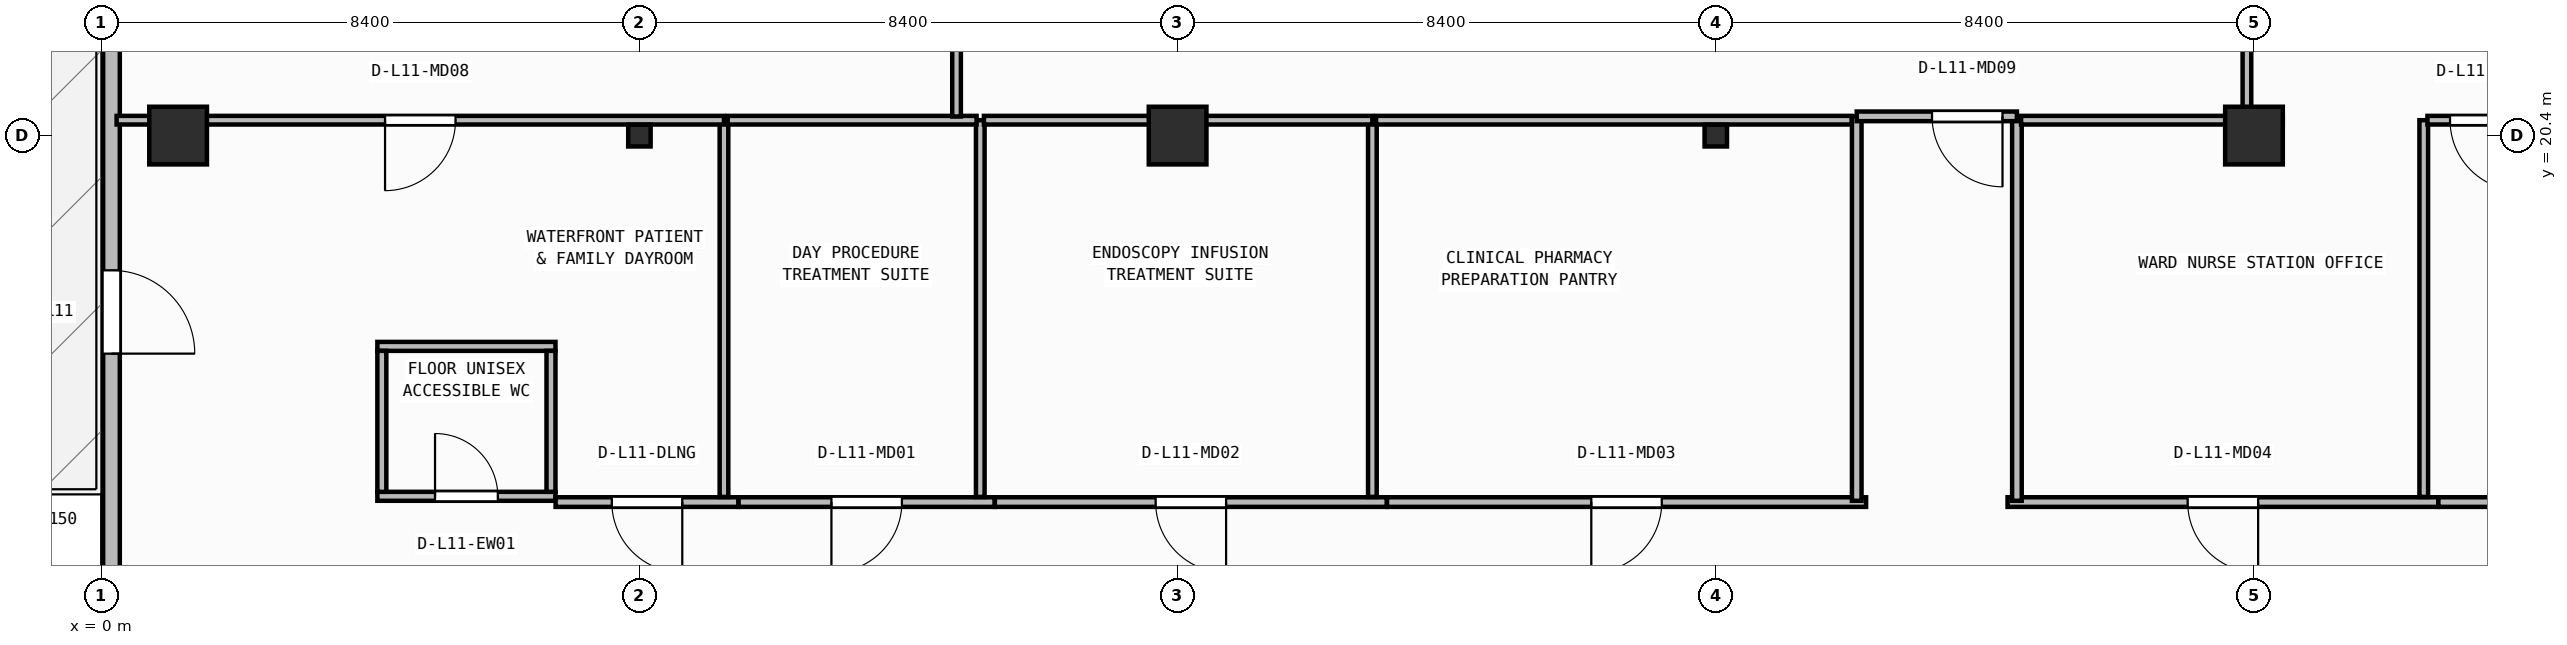
"""IFC4 building model, lengths in metres.
Left out: names, types, materials, properties, quantities, classifications, styles, units other than length and angle.
Written with IfcOpenShell. Run it as: python <this file> out.ifc"""

import sys

from ifc_helpers import new_model, si_unit, direction, frame, frame_2d, origin, origin_2d, place, context, subcontext, project, spatial, rectangle, i_section, extrude, element, fill, save


model = new_model("IFC4")
c1 = context("Model", 3, precision=1e-05, world=origin(), true_north=direction((0.0, 1.0)))
c2 = subcontext(c1, "Body", "Model", "MODEL_VIEW")
j1 = project(units=[si_unit("LENGTHUNIT", "METRE"), si_unit("PLANEANGLEUNIT", "RADIAN")], contexts=[c1])
p1 = place(None, origin())
s1 = spatial("IfcSite", under=j1, at=p1, CompositionType="ELEMENT")
p2 = place(p1, origin())
s2 = spatial("IfcBuilding", under=s1, at=p2, CompositionType="ELEMENT")
p3 = place(p2, frame((0.0, 0.0, 46.2)))
s3 = spatial("IfcBuildingStorey", under=s2, at=p3, CompositionType="ELEMENT", Elevation=46.2)
p4 = place(p3, frame((1.2, 20.4, 0.0), z_axis=(0.0, 0.0, 1.0), x_axis=(1.0, 0.0, 0.0)))
e1 = element("IfcColumn", 1, at=p4, inside=s3, PredefinedType="COLUMN", context=c2, shape_type="SweptSolid", body=[
    extrude(rectangle(XDim=0.9, YDim=0.9, at=origin_2d()), origin(), (0.0, 0.0, 1.0), 3.95),
])
p5 = place(p3, frame((8.4, 20.4, 0.0), z_axis=(0.0, 0.0, 1.0), x_axis=(1.0, 0.0, 0.0)))
e2 = element("IfcColumn", 2, at=p5, inside=s3, PredefinedType="COLUMN", context=c2, shape_type="SweptSolid", body=[
    extrude(i_section(OverallWidth=0.35, OverallDepth=0.34, WebThickness=0.016, FlangeThickness=0.028, at=origin_2d()), origin(), (0.0, 0.0, 1.0), 3.95),
])
p6 = place(p3, frame((16.8, 20.4, 0.0), z_axis=(0.0, 0.0, 1.0), x_axis=(1.0, 0.0, 0.0)))
e3 = element("IfcColumn", 3, at=p6, inside=s3, PredefinedType="COLUMN", context=c2, shape_type="SweptSolid", body=[
    extrude(rectangle(XDim=0.9, YDim=0.9, at=origin_2d()), origin(), (0.0, 0.0, 1.0), 3.95),
])
p7 = place(p3, frame((25.2, 20.4, 0.0), z_axis=(0.0, 0.0, 1.0), x_axis=(1.0, 0.0, 0.0)))
e4 = element("IfcColumn", 4, at=p7, inside=s3, PredefinedType="COLUMN", context=c2, shape_type="SweptSolid", body=[
    extrude(i_section(OverallWidth=0.35, OverallDepth=0.34, WebThickness=0.016, FlangeThickness=0.028, at=origin_2d()), origin(), (0.0, 0.0, 1.0), 3.95),
])
p8 = place(p3, frame((33.6, 20.4, 0.0), z_axis=(0.0, 0.0, 1.0), x_axis=(1.0, 0.0, 0.0)))
e5 = element("IfcColumn", 5, at=p8, inside=s3, PredefinedType="COLUMN", context=c2, shape_type="SweptSolid", body=[
    extrude(rectangle(XDim=0.9, YDim=0.9, at=origin_2d()), origin(), (0.0, 0.0, 1.0), 3.95),
])
p9 = place(p3, frame((0.16, 41.04, 0.0), z_axis=(0.0, 0.0, 1.0), x_axis=(0.0, -1.0, 0.0)))
e6 = element("IfcWall", 6, at=p9, inside=s3, PredefinedType="STANDARD", context=c2, shape_type="SweptSolid", body=[
    extrude(rectangle(XDim=38.28, YDim=0.26, at=frame_2d((19.14, 0.0))), origin(), (0.0, 0.0, 1.0), 3.71),
])
p10 = place(p9, frame((22.743, 0.0, 0.0)))
e7 = element("IfcOpeningElement", 7, at=p10, cuts=e6, PredefinedType="OPENING", context=c2, shape_type="SweptSolid", body=[
    extrude(rectangle(XDim=1.3, YDim=2.15, at=frame_2d((0.65, 1.075))), frame((0.0, 0.14, 0.0), z_axis=(0.0, -1.0, 0.0), x_axis=(1.0, 0.0, 0.0)), (0.0, 0.0, 1.0), 0.28),
])
p11 = place(p3, frame((4.31, 14.77, 0.0), z_axis=(0.0, 0.0, 1.0), x_axis=(1.0, 0.0, 0.0)))
e8 = element("IfcWall", 8, at=p11, inside=s3, PredefinedType="PARTITIONING", context=c2, shape_type="SweptSolid", body=[
    extrude(rectangle(XDim=2.78, YDim=0.14, at=frame_2d((1.39, 0.0))), origin(), (0.0, 0.0, 1.0), 3.71),
])
p12 = place(p11, frame((0.9, 0.0, 0.0)))
e9 = element("IfcOpeningElement", 9, at=p12, cuts=e8, PredefinedType="OPENING", context=c2, shape_type="SweptSolid", body=[
    extrude(rectangle(XDim=0.98, YDim=2.1, at=frame_2d((0.49, 1.05))), frame((0.0, 0.08, 0.0), z_axis=(0.0, -1.0, 0.0), x_axis=(1.0, 0.0, 0.0)), (0.0, 0.0, 1.0), 0.16),
])
p13 = place(p3, frame((4.31, 17.11, 0.0), z_axis=(0.0, 0.0, 1.0), x_axis=(1.0, 0.0, 0.0)))
e10 = element("IfcWall", 10, at=p13, inside=s3, PredefinedType="PARTITIONING", context=c2, shape_type="SweptSolid", body=[
    extrude(rectangle(XDim=2.78, YDim=0.14, at=frame_2d((1.39, 0.0))), origin(), (0.0, 0.0, 1.0), 3.71),
])
for number, where, z_axis, x_axis in (
    (11, (4.38, 14.84, 0.0), (0.0, 0.0, 1.0), (0.0, 1.0, 0.0)),
    (12, (7.02, 14.84, 0.0), (0.0, 0.0, 1.0), (0.0, 1.0, 0.0)),
):
    element("IfcWall", number, at=place(p3, frame(where, z_axis=z_axis, x_axis=x_axis)), inside=s3, PredefinedType="PARTITIONING", context=c2, shape_type="SweptSolid", body=[
        extrude(rectangle(XDim=2.2, YDim=0.14, at=frame_2d((1.1, 0.0))), origin(), (0.0, 0.0, 1.0), 3.71),
    ])
p14 = place(p3, frame((9.946, 14.68, 0.0), z_axis=(0.0, 0.0, 1.0), x_axis=(-1.0, 0.0, 0.0)))
e13 = element("IfcWall", 13, at=p14, inside=s3, PredefinedType="PARTITIONING", context=c2, shape_type="SweptSolid", body=[
    extrude(rectangle(XDim=2.854, YDim=0.15, at=frame_2d((1.427, 0.0))), origin(), (0.0, 0.0, 1.0), 3.71),
])
p15 = place(p14, frame((0.877, 0.0, 0.0)))
e14 = element("IfcOpeningElement", 14, at=p15, cuts=e13, PredefinedType="OPENING", context=c2, shape_type="SweptSolid", body=[
    extrude(rectangle(XDim=1.1, YDim=2.1, at=frame_2d((0.55, 1.05))), frame((0.0, 0.085, 0.0), z_axis=(0.0, -1.0, 0.0), x_axis=(1.0, 0.0, 0.0)), (0.0, 0.0, 1.0), 0.17),
])
p16 = place(p3, frame((13.946, 14.68, 0.0), z_axis=(0.0, 0.0, 1.0), x_axis=(-1.0, 0.0, 0.0)))
e15 = element("IfcWall", 15, at=p16, inside=s3, PredefinedType="PARTITIONING", context=c2, shape_type="SweptSolid", body=[
    extrude(rectangle(XDim=3.998, YDim=0.15, at=frame_2d((1.999, 0.0))), origin(), (0.0, 0.0, 1.0), 3.71),
])
p17 = place(p16, frame((1.449, 0.0, 0.0)))
e16 = element("IfcOpeningElement", 16, at=p17, cuts=e15, PredefinedType="OPENING", context=c2, shape_type="SweptSolid", body=[
    extrude(rectangle(XDim=1.1, YDim=2.1, at=frame_2d((0.55, 1.05))), frame((0.0, 0.085, 0.0), z_axis=(0.0, -1.0, 0.0), x_axis=(1.0, 0.0, 0.0)), (0.0, 0.0, 1.0), 0.17),
])
p18 = place(p3, frame((20.066, 14.68, 0.0), z_axis=(0.0, 0.0, 1.0), x_axis=(-1.0, 0.0, 0.0)))
e17 = element("IfcWall", 17, at=p18, inside=s3, PredefinedType="PARTITIONING", context=c2, shape_type="SweptSolid", body=[
    extrude(rectangle(XDim=6.118, YDim=0.15, at=frame_2d((3.059, 0.0))), origin(), (0.0, 0.0, 1.0), 3.71),
])
p19 = place(p18, frame((2.509, 0.0, 0.0)))
e18 = element("IfcOpeningElement", 18, at=p19, cuts=e17, PredefinedType="OPENING", context=c2, shape_type="SweptSolid", body=[
    extrude(rectangle(XDim=1.1, YDim=2.1, at=frame_2d((0.55, 1.05))), frame((0.0, 0.085, 0.0), z_axis=(0.0, -1.0, 0.0), x_axis=(1.0, 0.0, 0.0)), (0.0, 0.0, 1.0), 0.17),
])
p20 = place(p3, frame((27.546, 14.68, 0.0), z_axis=(0.0, 0.0, 1.0), x_axis=(-1.0, 0.0, 0.0)))
e19 = element("IfcWall", 19, at=p20, inside=s3, PredefinedType="PARTITIONING", context=c2, shape_type="SweptSolid", body=[
    extrude(rectangle(XDim=7.478, YDim=0.15, at=frame_2d((3.739, 0.0))), origin(), (0.0, 0.0, 1.0), 3.71),
])
p21 = place(p20, frame((3.189, 0.0, 0.0)))
e20 = element("IfcOpeningElement", 20, at=p21, cuts=e19, PredefinedType="OPENING", context=c2, shape_type="SweptSolid", body=[
    extrude(rectangle(XDim=1.1, YDim=2.1, at=frame_2d((0.55, 1.05))), frame((0.0, 0.085, 0.0), z_axis=(0.0, -1.0, 0.0), x_axis=(1.0, 0.0, 0.0)), (0.0, 0.0, 1.0), 0.17),
])
p22 = place(p3, frame((36.476, 14.68, 0.0), z_axis=(0.0, 0.0, 1.0), x_axis=(-1.0, 0.0, 0.0)))
e21 = element("IfcWall", 21, at=p22, inside=s3, PredefinedType="PARTITIONING", context=c2, shape_type="SweptSolid", body=[
    extrude(rectangle(XDim=6.722, YDim=0.15, at=frame_2d((3.361, 0.0))), origin(), (0.0, 0.0, 1.0), 3.71),
])
p23 = place(p22, frame((2.811, 0.0, 0.0)))
e22 = element("IfcOpeningElement", 22, at=p23, cuts=e21, PredefinedType="OPENING", context=c2, shape_type="SweptSolid", body=[
    extrude(rectangle(XDim=1.1, YDim=2.1, at=frame_2d((0.55, 1.05))), frame((0.0, 0.085, 0.0), z_axis=(0.0, -1.0, 0.0), x_axis=(1.0, 0.0, 0.0)), (0.0, 0.0, 1.0), 0.17),
])
p24 = place(p3, frame((44.136, 14.68, 0.0), z_axis=(0.0, 0.0, 1.0), x_axis=(-1.0, 0.0, 0.0)))
e23 = element("IfcWall", 23, at=p24, inside=s3, PredefinedType="PARTITIONING", context=c2, shape_type="SweptSolid", body=[
    extrude(rectangle(XDim=7.658, YDim=0.15, at=frame_2d((3.829, 0.0))), origin(), (0.0, 0.0, 1.0), 3.71),
])
p25 = place(p24, frame((3.279, 0.0, 0.0)))
e24 = element("IfcOpeningElement", 24, at=p25, cuts=e23, PredefinedType="OPENING", context=c2, shape_type="SweptSolid", body=[
    extrude(rectangle(XDim=1.1, YDim=2.1, at=frame_2d((0.55, 1.05))), frame((0.0, 0.085, 0.0), z_axis=(0.0, -1.0, 0.0), x_axis=(1.0, 0.0, 0.0)), (0.0, 0.0, 1.0), 0.17),
])
for number, where, z_axis, x_axis in (
    (25, (27.4, 20.7, 0.0), (0.0, 0.0, 1.0), (0.0, -1.0, 0.0)),
    (26, (29.9, 14.7, 0.0), (0.0, 0.0, 1.0), (0.0, 1.0, 0.0)),
):
    element("IfcWall", number, at=place(p3, frame(where, z_axis=z_axis, x_axis=x_axis)), inside=s3, PredefinedType="PARTITIONING", context=c2, shape_type="SweptSolid", body=[
        extrude(rectangle(XDim=6.0, YDim=0.15, at=frame_2d((3.0, 0.0))), origin(), (0.0, 0.0, 1.0), 3.71),
    ])
p26 = place(p3, frame((29.9, 20.7, 0.0), z_axis=(0.0, 0.0, 1.0), x_axis=(-1.0, 0.0, 0.0)))
e27 = element("IfcWall", 27, at=p26, inside=s3, PredefinedType="PARTITIONING", context=c2, shape_type="SweptSolid", body=[
    extrude(rectangle(XDim=2.5, YDim=0.15, at=frame_2d((1.25, 0.0))), origin(), (0.0, 0.0, 1.0), 3.073),
])
p27 = place(p26, frame((0.225, 0.0, 0.0)))
e28 = element("IfcOpeningElement", 28, at=p27, cuts=e27, PredefinedType="OPENING", context=c2, shape_type="SweptSolid", body=[
    extrude(rectangle(XDim=1.1, YDim=2.1, at=frame_2d((0.55, 1.05))), frame((0.0, 0.085, 0.0), z_axis=(0.0, -1.0, 0.0), x_axis=(1.0, 0.0, 0.0)), (0.0, 0.0, 1.0), 0.17),
])
p28 = place(p3, frame((9.72, 14.76, 0.0), z_axis=(0.0, 0.0, 1.0), x_axis=(0.0, 1.0, 0.0)))
e29 = element("IfcWall", 29, at=p28, inside=s3, PredefinedType="PARTITIONING", context=c2, shape_type="SweptSolid", body=[
    extrude(rectangle(XDim=5.88, YDim=0.135, at=frame_2d((2.94, 0.0))), origin(), (0.0, 0.0, 1.0), 3.71),
])
p29 = place(p3, frame((9.72, 20.64, 0.0), z_axis=(0.0, 0.0, 1.0), x_axis=(-1.0, 0.0, 0.0)))
e30 = element("IfcWall", 30, at=p29, inside=s3, PredefinedType="PARTITIONING", context=c2, shape_type="SweptSolid", body=[
    extrude(rectangle(XDim=9.48, YDim=0.135, at=frame_2d((4.74, 0.0))), origin(), (0.0, 0.0, 1.0), 3.073),
])
p30 = place(p29, frame((4.19, 0.0, 0.0)))
e31 = element("IfcOpeningElement", 31, at=p30, cuts=e30, PredefinedType="OPENING", context=c2, shape_type="SweptSolid", body=[
    extrude(rectangle(XDim=1.1, YDim=2.1, at=frame_2d((0.55, 1.05))), frame((0.0, 0.077, 0.0), z_axis=(0.0, -1.0, 0.0), x_axis=(1.0, 0.0, 0.0)), (0.0, 0.0, 1.0), 0.155),
])
p31 = place(p3, frame((13.72, 14.76, 0.0), z_axis=(0.0, 0.0, 1.0), x_axis=(0.0, 1.0, 0.0)))
e32 = element("IfcWall", 32, at=p31, inside=s3, PredefinedType="PARTITIONING", context=c2, shape_type="SweptSolid", body=[
    extrude(rectangle(XDim=5.88, YDim=0.135, at=frame_2d((2.94, 0.0))), origin(), (0.0, 0.0, 1.0), 3.71),
])
p32 = place(p3, frame((13.663, 20.64, 0.0), z_axis=(0.0, 0.0, 1.0), x_axis=(-1.0, 0.0, 0.0)))
e33 = element("IfcWall", 33, at=p32, inside=s3, PredefinedType="PARTITIONING", context=c2, shape_type="SweptSolid", body=[
    extrude(rectangle(XDim=3.885, YDim=0.135, at=frame_2d((1.942, 0.0))), origin(), (0.0, 0.0, 1.0), 3.073),
])
p33 = place(p3, frame((19.84, 14.76, 0.0), z_axis=(0.0, 0.0, 1.0), x_axis=(0.0, 1.0, 0.0)))
e34 = element("IfcWall", 34, at=p33, inside=s3, PredefinedType="PARTITIONING", context=c2, shape_type="SweptSolid", body=[
    extrude(rectangle(XDim=5.88, YDim=0.135, at=frame_2d((2.94, 0.0))), origin(), (0.0, 0.0, 1.0), 3.71),
])
p34 = place(p3, frame((19.84, 20.64, 0.0), z_axis=(0.0, 0.0, 1.0), x_axis=(-1.0, 0.0, 0.0)))
e35 = element("IfcWall", 35, at=p34, inside=s3, PredefinedType="PARTITIONING", context=c2, shape_type="SweptSolid", body=[
    extrude(rectangle(XDim=6.062, YDim=0.135, at=frame_2d((3.031, 0.0))), origin(), (0.0, 0.0, 1.0), 3.073),
])
p35 = place(p3, frame((27.32, 20.64, 0.0), z_axis=(0.0, 0.0, 1.0), x_axis=(-1.0, 0.0, 0.0)))
e36 = element("IfcWall", 36, at=p35, inside=s3, PredefinedType="PARTITIONING", context=c2, shape_type="SweptSolid", body=[
    extrude(rectangle(XDim=7.423, YDim=0.135, at=frame_2d((3.711, 0.0))), origin(), (0.0, 0.0, 1.0), 3.073),
])
p36 = place(p3, frame((36.25, 14.76, 0.0), z_axis=(0.0, 0.0, 1.0), x_axis=(0.0, 1.0, 0.0)))
e37 = element("IfcWall", 37, at=p36, inside=s3, PredefinedType="PARTITIONING", context=c2, shape_type="SweptSolid", body=[
    extrude(rectangle(XDim=5.88, YDim=0.135, at=frame_2d((2.94, 0.0))), origin(), (0.0, 0.0, 1.0), 3.71),
])
p37 = place(p3, frame((34.05, 20.64, 0.0), z_axis=(0.0, 0.0, 1.0), x_axis=(-1.0, 0.0, 0.0)))
e38 = element("IfcWall", 38, at=p37, inside=s3, PredefinedType="PARTITIONING", context=c2, shape_type="SweptSolid", body=[
    extrude(rectangle(XDim=4.085, YDim=0.135, at=frame_2d((2.042, 0.0))), origin(), (0.0, 0.0, 1.0), 3.073),
])
p38 = place(p3, frame((43.91, 20.64, 0.0), z_axis=(0.0, 0.0, 1.0), x_axis=(-1.0, 0.0, 0.0)))
e39 = element("IfcWall", 39, at=p38, inside=s3, PredefinedType="PARTITIONING", context=c2, shape_type="SweptSolid", body=[
    extrude(rectangle(XDim=7.602, YDim=0.135, at=frame_2d((3.801, 0.0))), origin(), (0.0, 0.0, 1.0), 3.073),
])
p39 = place(p38, frame((6.15, 0.0, 0.0)))
e40 = element("IfcOpeningElement", 40, at=p39, cuts=e39, PredefinedType="OPENING", context=c2, shape_type="SweptSolid", body=[
    extrude(rectangle(XDim=1.1, YDim=2.1, at=frame_2d((0.55, 1.05))), frame((0.0, 0.077, 0.0), z_axis=(0.0, -1.0, 0.0), x_axis=(1.0, 0.0, 0.0)), (0.0, 0.0, 1.0), 0.155),
])
p40 = place(p3, frame((13.35, 20.698, 0.0), z_axis=(0.0, 0.0, 1.0), x_axis=(0.0, 1.0, 0.0)))
e41 = element("IfcWall", 41, at=p40, inside=s3, PredefinedType="PARTITIONING", context=c2, shape_type="SweptSolid", body=[
    extrude(rectangle(XDim=6.442, YDim=0.135, at=frame_2d((3.221, 0.0))), origin(), (0.0, 0.0, 1.0), 3.71),
])
p41 = place(p3, frame((33.49, 20.698, 0.0), z_axis=(0.0, 0.0, 1.0), x_axis=(0.0, 1.0, 0.0)))
e42 = element("IfcWall", 42, at=p41, inside=s3, PredefinedType="PARTITIONING", context=c2, shape_type="SweptSolid", body=[
    extrude(rectangle(XDim=6.442, YDim=0.135, at=frame_2d((3.221, 0.0))), origin(), (0.0, 0.0, 1.0), 3.073),
])
p42 = place(p10, origin())
e43 = element("IfcDoor", 43, at=p42, inside=s3, OperationType="SINGLE_SWING_RIGHT", PredefinedType="DOOR", context=c2, shape_type="SweptSolid", body=[
    extrude(rectangle(XDim=1.3, YDim=2.15, at=frame_2d((0.65, 1.075))), frame((0.0, 0.025, 0.0), z_axis=(0.0, -1.0, 0.0), x_axis=(1.0, 0.0, 0.0)), (0.0, 0.0, 1.0), 0.05),
])
fill(e7, e43)
p43 = place(p12, origin())
e44 = element("IfcDoor", 44, at=p43, inside=s3, OperationType="SINGLE_SWING_LEFT", PredefinedType="DOOR", context=c2, shape_type="SweptSolid", body=[
    extrude(rectangle(XDim=0.98, YDim=2.1, at=frame_2d((0.49, 1.05))), frame((0.0, 0.025, 0.0), z_axis=(0.0, -1.0, 0.0), x_axis=(1.0, 0.0, 0.0)), (0.0, 0.0, 1.0), 0.05),
])
fill(e9, e44)
p44 = place(p15, origin())
e45 = element("IfcDoor", 45, at=p44, inside=s3, OperationType="SINGLE_SWING_LEFT", PredefinedType="DOOR", context=c2, shape_type="SweptSolid", body=[
    extrude(rectangle(XDim=1.1, YDim=2.1, at=frame_2d((0.55, 1.05))), frame((0.0, 0.025, 0.0), z_axis=(0.0, -1.0, 0.0), x_axis=(1.0, 0.0, 0.0)), (0.0, 0.0, 1.0), 0.05),
])
fill(e14, e45)
p45 = place(p17, origin())
e46 = element("IfcDoor", 46, at=p45, inside=s3, OperationType="SINGLE_SWING_RIGHT", PredefinedType="DOOR", context=c2, shape_type="SweptSolid", body=[
    extrude(rectangle(XDim=1.1, YDim=2.1, at=frame_2d((0.55, 1.05))), frame((0.0, 0.025, 0.0), z_axis=(0.0, -1.0, 0.0), x_axis=(1.0, 0.0, 0.0)), (0.0, 0.0, 1.0), 0.05),
])
fill(e16, e46)
p46 = place(p19, origin())
e47 = element("IfcDoor", 47, at=p46, inside=s3, OperationType="SINGLE_SWING_LEFT", PredefinedType="DOOR", context=c2, shape_type="SweptSolid", body=[
    extrude(rectangle(XDim=1.1, YDim=2.1, at=frame_2d((0.55, 1.05))), frame((0.0, 0.025, 0.0), z_axis=(0.0, -1.0, 0.0), x_axis=(1.0, 0.0, 0.0)), (0.0, 0.0, 1.0), 0.05),
])
fill(e18, e47)
p47 = place(p21, origin())
e48 = element("IfcDoor", 48, at=p47, inside=s3, OperationType="SINGLE_SWING_RIGHT", PredefinedType="DOOR", context=c2, shape_type="SweptSolid", body=[
    extrude(rectangle(XDim=1.1, YDim=2.1, at=frame_2d((0.55, 1.05))), frame((0.0, 0.025, 0.0), z_axis=(0.0, -1.0, 0.0), x_axis=(1.0, 0.0, 0.0)), (0.0, 0.0, 1.0), 0.05),
])
fill(e20, e48)
p48 = place(p23, origin())
e49 = element("IfcDoor", 49, at=p48, inside=s3, OperationType="SINGLE_SWING_LEFT", PredefinedType="DOOR", context=c2, shape_type="SweptSolid", body=[
    extrude(rectangle(XDim=1.1, YDim=2.1, at=frame_2d((0.55, 1.05))), frame((0.0, 0.025, 0.0), z_axis=(0.0, -1.0, 0.0), x_axis=(1.0, 0.0, 0.0)), (0.0, 0.0, 1.0), 0.05),
])
fill(e22, e49)
p49 = place(p27, origin())
e50 = element("IfcDoor", 50, at=p49, inside=s3, OperationType="SINGLE_SWING_LEFT", PredefinedType="DOOR", context=c2, shape_type="SweptSolid", body=[
    extrude(rectangle(XDim=1.1, YDim=2.1, at=frame_2d((0.55, 1.05))), frame((0.0, 0.025, 0.0), z_axis=(0.0, -1.0, 0.0), x_axis=(1.0, 0.0, 0.0)), (0.0, 0.0, 1.0), 0.05),
])
fill(e28, e50)
p50 = place(p30, origin())
e51 = element("IfcDoor", 51, at=p50, inside=s3, OperationType="SINGLE_SWING_RIGHT", PredefinedType="DOOR", context=c2, shape_type="SweptSolid", body=[
    extrude(rectangle(XDim=1.1, YDim=2.1, at=frame_2d((0.55, 1.05))), frame((0.0, 0.025, 0.0), z_axis=(0.0, -1.0, 0.0), x_axis=(1.0, 0.0, 0.0)), (0.0, 0.0, 1.0), 0.05),
])
fill(e31, e51)
p51 = place(p39, origin())
e52 = element("IfcDoor", 52, at=p51, inside=s3, OperationType="SINGLE_SWING_LEFT", PredefinedType="DOOR", context=c2, shape_type="SweptSolid", body=[
    extrude(rectangle(XDim=1.1, YDim=2.1, at=frame_2d((0.55, 1.05))), frame((0.0, 0.025, 0.0), z_axis=(0.0, -1.0, 0.0), x_axis=(1.0, 0.0, 0.0)), (0.0, 0.0, 1.0), 0.05),
])
fill(e40, e52)
save(model, sys.argv[1])
